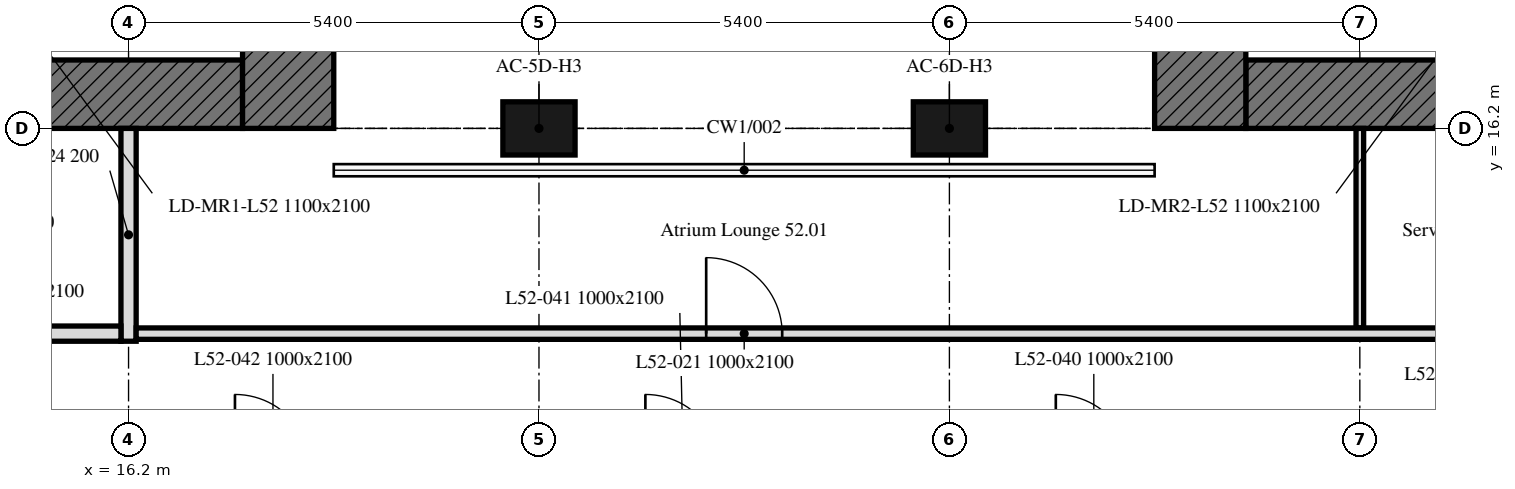
"""IFC4 building model, lengths in metres.
Left out: names, types, materials, properties, quantities, classifications, styles, units other than length and angle.
Written with IfcOpenShell. Run it as: python <this file> out.ifc"""

import sys

from ifc_helpers import new_model, si_unit, direction, frame, frame_2d, origin, origin_2d, place, context, subcontext, project, spatial, rectangle, extrude, element, fill, save


model = new_model("IFC4")
c1 = context("Model", 3, precision=1e-05, world=origin(), true_north=direction((0.0, 1.0)))
c2 = subcontext(c1, "Body", "Model", "MODEL_VIEW")
j1 = project(units=[si_unit("LENGTHUNIT", "METRE"), si_unit("PLANEANGLEUNIT", "RADIAN")], contexts=[c1])
p1 = place(None, origin())
s1 = spatial("IfcSite", under=j1, at=p1, CompositionType="ELEMENT")
p2 = place(p1, origin())
s2 = spatial("IfcBuilding", under=s1, at=p2, CompositionType="ELEMENT")
p3 = place(p2, frame((0.0, 0.0, 210.4)))
s3 = spatial("IfcBuildingStorey", under=s2, at=p3, CompositionType="ELEMENT", Elevation=210.4)
for number, where, z_axis, x_axis in (
    (1, (21.6, 16.2, 0.0), (0.0, 0.0, 1.0), (1.0, 0.0, 0.0)),
    (2, (27.0, 16.2, 0.0), (0.0, 0.0, 1.0), (1.0, 0.0, 0.0)),
):
    element("IfcColumn", number, at=place(p3, frame(where, z_axis=z_axis, x_axis=x_axis)), inside=s3, PredefinedType="COLUMN", context=c2, shape_type="SweptSolid", body=[
        extrude(rectangle(XDim=0.95, YDim=0.7, at=origin_2d()), origin(), (0.0, 0.0, 1.0), 3.0),
    ])
p4 = place(p3, frame((17.7, 16.65, 0.0), z_axis=(0.0, 0.0, 1.0), x_axis=(-1.0, 0.0, 0.0)))
e3 = element("IfcWall", 3, at=p4, inside=s3, PredefinedType="SOLIDWALL", context=c2, shape_type="SweptSolid", body=[
    extrude(rectangle(XDim=11.1, YDim=0.9, at=frame_2d((5.55, 0.0))), origin(), (0.0, 0.0, 1.0), 3.0),
])
p5 = place(p4, frame((5.55, 0.0, 0.0)))
e4 = element("IfcOpeningElement", 4, at=p5, cuts=e3, PredefinedType="OPENING", context=c2, shape_type="SweptSolid", body=[
    extrude(rectangle(XDim=2.0, YDim=2.4, at=frame_2d((1.0, 1.2))), frame((0.0, 0.45, 0.0), z_axis=(0.0, -1.0, 0.0), x_axis=(1.0, 0.0, 0.0)), (0.0, 0.0, 1.0), 0.9),
])
p6 = place(p3, frame((18.3, 32.4, 0.0), z_axis=(0.0, 0.0, 1.0), x_axis=(0.0, -1.0, 0.0)))
e5 = element("IfcWall", 5, at=p6, inside=s3, PredefinedType="SOLIDWALL", context=c2, shape_type="SweptSolid", body=[
    extrude(rectangle(XDim=16.2, YDim=1.2, at=frame_2d((8.1, 0.0))), origin(), (0.0, 0.0, 1.0), 3.0),
])
p7 = place(p3, frame((42.0, 16.65, 0.0), z_axis=(0.0, 0.0, 1.0), x_axis=(-1.0, 0.0, 0.0)))
e6 = element("IfcWall", 6, at=p7, inside=s3, PredefinedType="SOLIDWALL", context=c2, shape_type="SweptSolid", body=[
    extrude(rectangle(XDim=11.1, YDim=0.9, at=frame_2d((5.55, 0.0))), origin(), (0.0, 0.0, 1.0), 3.0),
])
p8 = place(p7, frame((3.55, 0.0, 0.0)))
e7 = element("IfcOpeningElement", 7, at=p8, cuts=e6, PredefinedType="OPENING", context=c2, shape_type="SweptSolid", body=[
    extrude(rectangle(XDim=2.0, YDim=2.4, at=frame_2d((1.0, 1.2))), frame((0.0, 0.45, 0.0), z_axis=(0.0, -1.0, 0.0), x_axis=(1.0, 0.0, 0.0)), (0.0, 0.0, 1.0), 0.9),
])
p9 = place(p3, frame((30.3, 16.2, 0.0), z_axis=(0.0, 0.0, 1.0), x_axis=(0.0, 1.0, 0.0)))
e8 = element("IfcWall", 8, at=p9, inside=s3, PredefinedType="SOLIDWALL", context=c2, shape_type="SweptSolid", body=[
    extrude(rectangle(XDim=16.2, YDim=1.2, at=frame_2d((8.1, 0.0))), origin(), (0.0, 0.0, 1.0), 3.0),
])
p10 = place(p3, frame((32.4, 13.575, 0.0), z_axis=(0.0, 0.0, 1.0), x_axis=(0.0, 1.0, 0.0)))
e9 = element("IfcWall", 9, at=p10, inside=s3, PredefinedType="PARTITIONING", context=c2, shape_type="SweptSolid", body=[
    extrude(rectangle(XDim=2.625, YDim=0.1, at=frame_2d((1.312, 0.0))), origin(), (0.0, 0.0, 1.0), 3.0),
])
p11 = place(p3, frame((16.2, 16.2, 0.0), z_axis=(0.0, 0.0, 1.0), x_axis=(0.0, -1.0, 0.0)))
e10 = element("IfcWall", 10, at=p11, inside=s3, PredefinedType="PARTITIONING", context=c2, shape_type="SweptSolid", body=[
    extrude(rectangle(XDim=2.8, YDim=0.2, at=frame_2d((1.4, 0.0))), origin(), (0.0, 0.0, 1.0), 3.0),
])
p12 = place(p3, frame((16.3, 13.5, 0.0), z_axis=(0.0, 0.0, 1.0), x_axis=(1.0, 0.0, 0.0)))
e11 = element("IfcWall", 11, at=p12, inside=s3, PredefinedType="PARTITIONING", context=c2, shape_type="SweptSolid", body=[
    extrude(rectangle(XDim=26.149, YDim=0.15, at=frame_2d((13.074, 0.0))), origin(), (0.0, 0.0, 1.0), 3.0),
])
p13 = place(p12, frame((7.5, 0.0, 0.0)))
e12 = element("IfcOpeningElement", 12, at=p13, cuts=e11, PredefinedType="OPENING", context=c2, shape_type="SweptSolid", body=[
    extrude(rectangle(XDim=1.0, YDim=2.1, at=frame_2d((0.5, 1.05))), frame((0.0, 0.075, 0.0), z_axis=(0.0, -1.0, 0.0), x_axis=(1.0, 0.0, 0.0)), (0.0, 0.0, 1.0), 0.15),
])
p14 = place(p12, frame((23.12, 0.0, 0.0)))
e13 = element("IfcOpeningElement", 13, at=p14, cuts=e11, PredefinedType="OPENING", context=c2, shape_type="SweptSolid", body=[
    extrude(rectangle(XDim=1.0, YDim=2.1, at=frame_2d((0.5, 1.05))), frame((0.0, 0.075, 0.0), z_axis=(0.0, -1.0, 0.0), x_axis=(1.0, 0.0, 0.0)), (0.0, 0.0, 1.0), 0.15),
])
p15 = place(p12, frame((17.225, 0.0, 0.0)))
e14 = element("IfcOpeningElement", 14, at=p15, cuts=e11, PredefinedType="OPENING", context=c2, shape_type="SweptSolid", body=[
    extrude(rectangle(XDim=1.0, YDim=2.1, at=frame_2d((0.5, 1.05))), frame((0.0, 0.075, 0.0), z_axis=(0.0, -1.0, 0.0), x_axis=(1.0, 0.0, 0.0)), (0.0, 0.0, 1.0), 0.15),
])
p16 = place(p12, frame((19.65, 0.0, 0.0)))
e15 = element("IfcOpeningElement", 15, at=p16, cuts=e11, PredefinedType="OPENING", context=c2, shape_type="SweptSolid", body=[
    extrude(rectangle(XDim=1.8, YDim=2.4, at=frame_2d((0.9, 1.2))), frame((0.0, 0.075, 0.0), z_axis=(0.0, -1.0, 0.0), x_axis=(1.0, 0.0, 0.0)), (0.0, 0.0, 1.0), 0.15),
])
p17 = place(p3, frame((16.1, 13.5, 0.0), z_axis=(0.0, 0.0, 1.0), x_axis=(-1.0, 0.0, 0.0)))
e16 = element("IfcWall", 16, at=p17, inside=s3, PredefinedType="PARTITIONING", context=c2, shape_type="SweptSolid", body=[
    extrude(rectangle(XDim=3.05, YDim=0.2, at=frame_2d((1.525, 0.0))), origin(), (0.0, 0.0, 1.0), 3.0),
])
p18 = place(p17, frame((1.025, 0.0, 0.0)))
e17 = element("IfcOpeningElement", 17, at=p18, cuts=e16, PredefinedType="OPENING", context=c2, shape_type="SweptSolid", body=[
    extrude(rectangle(XDim=1.0, YDim=2.1, at=frame_2d((0.5, 1.05))), frame((0.0, 0.1, 0.0), z_axis=(0.0, -1.0, 0.0), x_axis=(1.0, 0.0, 0.0)), (0.0, 0.0, 1.0), 0.2),
])
p19 = place(p13, origin())
e18 = element("IfcDoor", 18, at=p19, inside=s3, OperationType="SINGLE_SWING_RIGHT", PredefinedType="DOOR", context=c2, shape_type="SweptSolid", body=[
    extrude(rectangle(XDim=1.0, YDim=2.1, at=frame_2d((0.5, 1.05))), frame((0.0, 0.025, 0.0), z_axis=(0.0, -1.0, 0.0), x_axis=(1.0, 0.0, 0.0)), (0.0, 0.0, 1.0), 0.05),
])
fill(e12, e18)
save(model, sys.argv[1])
